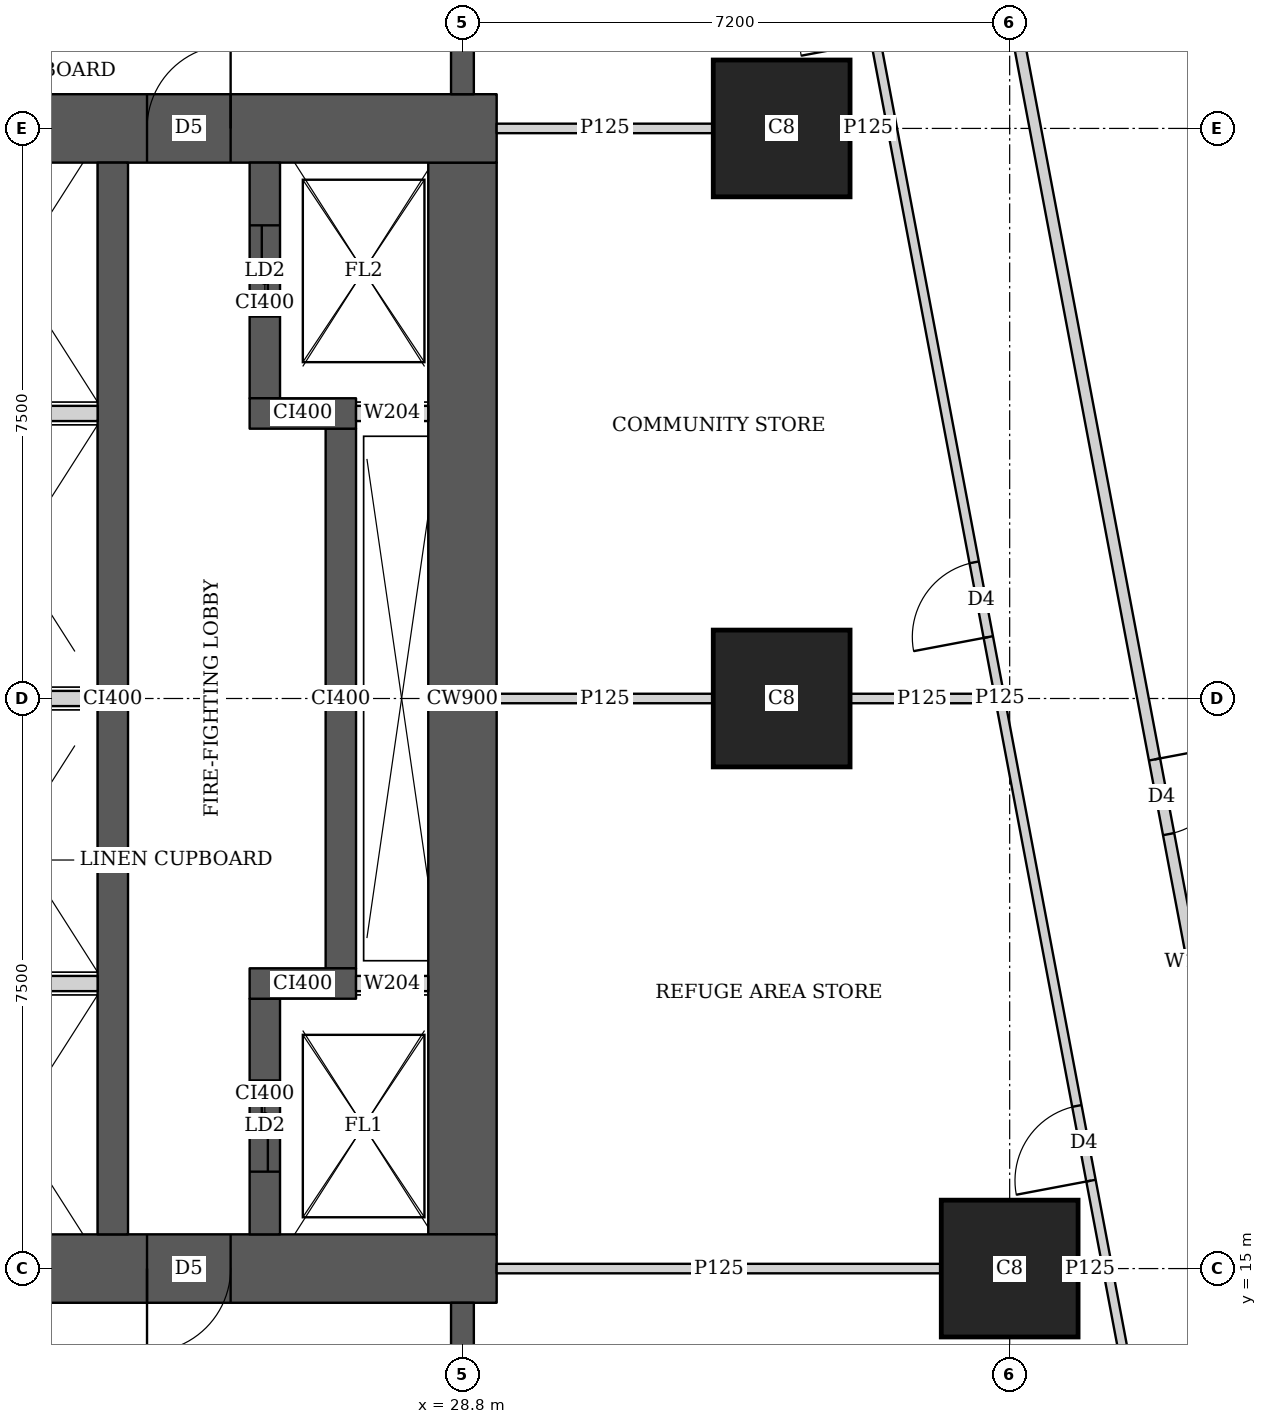
"""IFC4 building model, lengths in metres.
Left out: names, types, materials, properties, quantities, classifications, styles, units other than length and angle.
Written with IfcOpenShell. Run it as: python <this file> out.ifc"""

import sys

from ifc_helpers import new_model, si_unit, direction, frame, frame_2d, origin, origin_2d, place, context, subcontext, project, spatial, rectangle, extrude, element, fill, save


model = new_model("IFC4")
c1 = context("Model", 3, precision=1e-05, world=origin(), true_north=direction((0.0, 1.0)))
c2 = subcontext(c1, "Body", "Model", "MODEL_VIEW")
j1 = project(units=[si_unit("LENGTHUNIT", "METRE"), si_unit("PLANEANGLEUNIT", "RADIAN")], contexts=[c1])
p1 = place(None, origin())
s1 = spatial("IfcSite", under=j1, at=p1, CompositionType="ELEMENT")
p2 = place(p1, origin())
s2 = spatial("IfcBuilding", under=s1, at=p2, CompositionType="ELEMENT")
p3 = place(p2, frame((0.0, 0.0, 72.5)))
s3 = spatial("IfcBuildingStorey", under=s2, at=p3, CompositionType="ELEMENT", Elevation=72.5)
for number, where, z_axis, x_axis in (
    (1, (36.0, 15.0, 0.0), (0.0, 0.0, 1.0), (1.0, 0.0, 0.0)),
    (2, (33.0, 22.5, 0.0), (0.0, 0.0, 1.0), (1.0, 0.0, 0.0)),
    (3, (33.0, 30.0, 0.0), (0.0, 0.0, 1.0), (1.0, 0.0, 0.0)),
):
    element("IfcColumn", number, at=place(p3, frame(where, z_axis=z_axis, x_axis=x_axis)), inside=s3, PredefinedType="COLUMN", context=c2, shape_type="SweptSolid", body=[
        extrude(rectangle(XDim=1.8, YDim=1.8, at=origin_2d()), origin(), (0.0, 0.0, 1.0), 5.4),
    ])
p4 = place(p3, frame((13.95, 15.0, 0.0), z_axis=(0.0, 0.0, 1.0), x_axis=(1.0, 0.0, 0.0)))
e4 = element("IfcWall", 4, at=p4, inside=s3, PredefinedType="SHEAR", context=c2, shape_type="SweptSolid", body=[
    extrude(rectangle(XDim=15.3, YDim=0.9, at=frame_2d((7.65, 0.0))), origin(), (0.0, 0.0, 1.0), 5.4),
])
p5 = place(p4, frame((4.45, 0.0, 0.0)))
e5 = element("IfcOpeningElement", 5, at=p5, cuts=e4, PredefinedType="OPENING", context=c2, shape_type="SweptSolid", body=[
    extrude(rectangle(XDim=1.8, YDim=2.1, at=frame_2d((0.9, 1.05))), frame((0.0, 0.46, 0.0), z_axis=(0.0, -1.0, 0.0), x_axis=(1.0, 0.0, 0.0)), (0.0, 0.0, 1.0), 0.92),
])
p6 = place(p4, frame((10.7, 0.0, 0.0)))
e6 = element("IfcOpeningElement", 6, at=p6, cuts=e4, PredefinedType="OPENING", context=c2, shape_type="SweptSolid", body=[
    extrude(rectangle(XDim=1.1, YDim=2.1, at=frame_2d((0.55, 1.05))), frame((0.0, 0.46, 0.0), z_axis=(0.0, -1.0, 0.0), x_axis=(1.0, 0.0, 0.0)), (0.0, 0.0, 1.0), 0.92),
])
p7 = place(p3, frame((13.95, 30.0, 0.0), z_axis=(0.0, 0.0, 1.0), x_axis=(1.0, 0.0, 0.0)))
e7 = element("IfcWall", 7, at=p7, inside=s3, PredefinedType="SHEAR", context=c2, shape_type="SweptSolid", body=[
    extrude(rectangle(XDim=15.3, YDim=0.9, at=frame_2d((7.65, 0.0))), origin(), (0.0, 0.0, 1.0), 5.4),
])
p8 = place(p7, frame((4.45, 0.0, 0.0)))
e8 = element("IfcOpeningElement", 8, at=p8, cuts=e7, PredefinedType="OPENING", context=c2, shape_type="SweptSolid", body=[
    extrude(rectangle(XDim=1.8, YDim=2.1, at=frame_2d((0.9, 1.05))), frame((0.0, 0.46, 0.0), z_axis=(0.0, -1.0, 0.0), x_axis=(1.0, 0.0, 0.0)), (0.0, 0.0, 1.0), 0.92),
])
p9 = place(p7, frame((10.7, 0.0, 0.0)))
e9 = element("IfcOpeningElement", 9, at=p9, cuts=e7, PredefinedType="OPENING", context=c2, shape_type="SweptSolid", body=[
    extrude(rectangle(XDim=1.1, YDim=2.1, at=frame_2d((0.55, 1.05))), frame((0.0, 0.46, 0.0), z_axis=(0.0, -1.0, 0.0), x_axis=(1.0, 0.0, 0.0)), (0.0, 0.0, 1.0), 0.92),
])
p10 = place(p3, frame((28.8, 15.45, 0.0), z_axis=(0.0, 0.0, 1.0), x_axis=(0.0, 1.0, 0.0)))
e10 = element("IfcWall", 10, at=p10, inside=s3, PredefinedType="SHEAR", context=c2, shape_type="SweptSolid", body=[
    extrude(rectangle(XDim=14.1, YDim=0.9, at=frame_2d((7.05, 0.0))), origin(), (0.0, 0.0, 1.0), 5.4),
])
p11 = place(p3, frame((24.2, 15.45, 0.0), z_axis=(0.0, 0.0, 1.0), x_axis=(0.0, 1.0, 0.0)))
e11 = element("IfcWall", 11, at=p11, inside=s3, PredefinedType="SHEAR", context=c2, shape_type="SweptSolid", body=[
    extrude(rectangle(XDim=14.1, YDim=0.4, at=frame_2d((7.05, 0.0))), origin(), (0.0, 0.0, 1.0), 5.4),
])
p12 = place(p3, frame((26.2, 15.45, 0.0), z_axis=(0.0, 0.0, 1.0), x_axis=(0.0, 1.0, 0.0)))
e12 = element("IfcWall", 12, at=p12, inside=s3, PredefinedType="SHEAR", context=c2, shape_type="SweptSolid", body=[
    extrude(rectangle(XDim=3.1, YDim=0.4, at=frame_2d((1.55, 0.0))), origin(), (0.0, 0.0, 1.0), 5.4),
])
p13 = place(p12, frame((0.825, 0.0, 0.0)))
e13 = element("IfcOpeningElement", 13, at=p13, cuts=e12, PredefinedType="OPENING", context=c2, shape_type="SweptSolid", body=[
    extrude(rectangle(XDim=1.2, YDim=2.1, at=frame_2d((0.6, 1.05))), frame((0.0, 0.21, 0.0), z_axis=(0.0, -1.0, 0.0), x_axis=(1.0, 0.0, 0.0)), (0.0, 0.0, 1.0), 0.42),
])
p14 = place(p3, frame((26.0, 18.75, 0.0), z_axis=(0.0, 0.0, 1.0), x_axis=(1.0, 0.0, 0.0)))
e14 = element("IfcWall", 14, at=p14, inside=s3, PredefinedType="SHEAR", context=c2, shape_type="SweptSolid", body=[
    extrude(rectangle(XDim=1.4, YDim=0.4, at=frame_2d((0.7, 0.0))), origin(), (0.0, 0.0, 1.0), 5.4),
])
p15 = place(p3, frame((27.2, 18.95, 0.0), z_axis=(0.0, 0.0, 1.0), x_axis=(0.0, 1.0, 0.0)))
e15 = element("IfcWall", 15, at=p15, inside=s3, PredefinedType="SHEAR", context=c2, shape_type="SweptSolid", body=[
    extrude(rectangle(XDim=7.1, YDim=0.4, at=frame_2d((3.55, 0.0))), origin(), (0.0, 0.0, 1.0), 5.4),
])
p16 = place(p3, frame((26.0, 26.25, 0.0), z_axis=(0.0, 0.0, 1.0), x_axis=(1.0, 0.0, 0.0)))
e16 = element("IfcWall", 16, at=p16, inside=s3, PredefinedType="SHEAR", context=c2, shape_type="SweptSolid", body=[
    extrude(rectangle(XDim=1.4, YDim=0.4, at=frame_2d((0.7, 0.0))), origin(), (0.0, 0.0, 1.0), 5.4),
])
p17 = place(p3, frame((26.2, 26.45, 0.0), z_axis=(0.0, 0.0, 1.0), x_axis=(0.0, 1.0, 0.0)))
e17 = element("IfcWall", 17, at=p17, inside=s3, PredefinedType="SHEAR", context=c2, shape_type="SweptSolid", body=[
    extrude(rectangle(XDim=3.1, YDim=0.4, at=frame_2d((1.55, 0.0))), origin(), (0.0, 0.0, 1.0), 5.4),
])
p18 = place(p17, frame((1.075, 0.0, 0.0)))
e18 = element("IfcOpeningElement", 18, at=p18, cuts=e17, PredefinedType="OPENING", context=c2, shape_type="SweptSolid", body=[
    extrude(rectangle(XDim=1.2, YDim=2.1, at=frame_2d((0.6, 1.05))), frame((0.0, 0.21, 0.0), z_axis=(0.0, -1.0, 0.0), x_axis=(1.0, 0.0, 0.0)), (0.0, 0.0, 1.0), 0.42),
])
for number, where, z_axis, x_axis in (
    (19, (28.8, 10.35, 0.0), (0.0, 0.0, 1.0), (0.0, 1.0, 0.0)),
    (20, (28.8, 30.45, 0.0), (0.0, 0.0, 1.0), (0.0, 1.0, 0.0)),
):
    element("IfcWall", number, at=place(p3, frame(where, z_axis=z_axis, x_axis=x_axis)), inside=s3, PredefinedType="SHEAR", context=c2, shape_type="SweptSolid", body=[
        extrude(rectangle(XDim=4.2, YDim=0.3, at=frame_2d((2.1, 0.0))), origin(), (0.0, 0.0, 1.0), 5.4),
    ])
p19 = place(p3, frame((35.094, 36.585, 0.0), z_axis=(0.0, 0.0, 1.0), x_axis=(0.185591455861, -0.982626995106, 0.0)))
e21 = element("IfcWall", 21, at=p19, inside=s3, PredefinedType="SOLIDWALL", context=c2, shape_type="SweptSolid", body=[
    extrude(rectangle(XDim=35.735, YDim=0.15, at=frame_2d((17.867, 0.0))), origin(), (0.0, 0.0, 1.0), 3.35),
])
p20 = place(p19, frame((15.15, 0.0, 0.0)))
e22 = element("IfcOpeningElement", 22, at=p20, cuts=e21, PredefinedType="OPENING", context=c2, shape_type="SweptSolid", body=[
    extrude(rectangle(XDim=1.0, YDim=2.1, at=frame_2d((0.5, 1.05))), frame((0.0, 0.085, 0.0), z_axis=(0.0, -1.0, 0.0), x_axis=(1.0, 0.0, 0.0)), (0.0, 0.0, 1.0), 0.17),
])
p21 = place(p3, frame((38.202, 10.163, 0.0), z_axis=(0.0, 0.0, 1.0), x_axis=(-0.185610321132, 0.982623431783, 0.0)))
e23 = element("IfcWall", 23, at=p21, inside=s3, PredefinedType="PARTITIONING", context=c2, shape_type="SweptSolid", body=[
    extrude(rectangle(XDim=25.111, YDim=0.125, at=frame_2d((12.556, 0.0))), origin(), (0.0, 0.0, 1.0), 3.55),
])
p22 = place(p21, frame((0.708, 0.0, 0.0)))
e24 = element("IfcOpeningElement", 24, at=p22, cuts=e23, PredefinedType="OPENING", context=c2, shape_type="SweptSolid", body=[
    extrude(rectangle(XDim=1.0, YDim=2.1, at=frame_2d((0.5, 1.05))), frame((0.0, 0.073, 0.0), z_axis=(0.0, -1.0, 0.0), x_axis=(1.0, 0.0, 0.0)), (0.0, 0.0, 1.0), 0.145),
])
p23 = place(p21, frame((6.1, 0.0, 0.0)))
e25 = element("IfcOpeningElement", 25, at=p23, cuts=e23, PredefinedType="OPENING", context=c2, shape_type="SweptSolid", body=[
    extrude(rectangle(XDim=1.0, YDim=2.1, at=frame_2d((0.5, 1.05))), frame((0.0, 0.073, 0.0), z_axis=(0.0, -1.0, 0.0), x_axis=(1.0, 0.0, 0.0)), (0.0, 0.0, 1.0), 0.145),
])
p24 = place(p21, frame((13.378, 0.0, 0.0)))
e26 = element("IfcOpeningElement", 26, at=p24, cuts=e23, PredefinedType="OPENING", context=c2, shape_type="SweptSolid", body=[
    extrude(rectangle(XDim=1.0, YDim=2.1, at=frame_2d((0.5, 1.05))), frame((0.0, 0.073, 0.0), z_axis=(0.0, -1.0, 0.0), x_axis=(1.0, 0.0, 0.0)), (0.0, 0.0, 1.0), 0.145),
])
p25 = place(p21, frame((21.35, 0.0, 0.0)))
e27 = element("IfcOpeningElement", 27, at=p25, cuts=e23, PredefinedType="OPENING", context=c2, shape_type="SweptSolid", body=[
    extrude(rectangle(XDim=1.0, YDim=2.1, at=frame_2d((0.5, 1.05))), frame((0.0, 0.073, 0.0), z_axis=(0.0, -1.0, 0.0), x_axis=(1.0, 0.0, 0.0)), (0.0, 0.0, 1.0), 0.145),
])
p26 = place(p3, frame((29.25, 15.0, 0.0), z_axis=(0.0, 0.0, 1.0), x_axis=(1.0, 0.0, 0.0)))
e28 = element("IfcWall", 28, at=p26, inside=s3, PredefinedType="PARTITIONING", context=c2, shape_type="SweptSolid", body=[
    extrude(rectangle(XDim=5.849, YDim=0.125, at=frame_2d((2.925, 0.0))), origin(), (0.0, 0.0, 1.0), 3.55),
])
p27 = place(p3, frame((36.901, 15.0, 0.0), z_axis=(0.0, 0.0, 1.0), x_axis=(1.0, 0.0, 0.0)))
e29 = element("IfcWall", 29, at=p27, inside=s3, PredefinedType="PARTITIONING", context=c2, shape_type="SweptSolid", body=[
    extrude(rectangle(XDim=0.312, YDim=0.125, at=frame_2d((0.156, 0.0))), origin(), (0.0, 0.0, 1.0), 3.55),
])
p28 = place(p3, frame((29.25, 22.5, 0.0), z_axis=(0.0, 0.0, 1.0), x_axis=(1.0, 0.0, 0.0)))
e30 = element("IfcWall", 30, at=p28, inside=s3, PredefinedType="PARTITIONING", context=c2, shape_type="SweptSolid", body=[
    extrude(rectangle(XDim=2.849, YDim=0.125, at=frame_2d((1.425, 0.0))), origin(), (0.0, 0.0, 1.0), 3.55),
])
p29 = place(p3, frame((33.901, 22.5, 0.0), z_axis=(0.0, 0.0, 1.0), x_axis=(1.0, 0.0, 0.0)))
e31 = element("IfcWall", 31, at=p29, inside=s3, PredefinedType="PARTITIONING", context=c2, shape_type="SweptSolid", body=[
    extrude(rectangle(XDim=1.895, YDim=0.125, at=frame_2d((0.948, 0.0))), origin(), (0.0, 0.0, 1.0), 3.55),
])
p30 = place(p3, frame((29.25, 30.0, 0.0), z_axis=(0.0, 0.0, 1.0), x_axis=(1.0, 0.0, 0.0)))
e32 = element("IfcWall", 32, at=p30, inside=s3, PredefinedType="PARTITIONING", context=c2, shape_type="SweptSolid", body=[
    extrude(rectangle(XDim=2.849, YDim=0.125, at=frame_2d((1.425, 0.0))), origin(), (0.0, 0.0, 1.0), 3.55),
])
p31 = place(p3, frame((33.901, 30.0, 0.0), z_axis=(0.0, 0.0, 1.0), x_axis=(1.0, 0.0, 0.0)))
e33 = element("IfcWall", 33, at=p31, inside=s3, PredefinedType="PARTITIONING", context=c2, shape_type="SweptSolid", body=[
    extrude(rectangle(XDim=0.478, YDim=0.125, at=frame_2d((0.239, 0.0))), origin(), (0.0, 0.0, 1.0), 3.55),
])
for number, where, z_axis, x_axis in (
    (34, (21.8, 18.75, 0.0), (0.0, 0.0, 1.0), (1.0, 0.0, 0.0)),
    (35, (21.8, 22.5, 0.0), (0.0, 0.0, 1.0), (1.0, 0.0, 0.0)),
    (36, (21.8, 26.25, 0.0), (0.0, 0.0, 1.0), (1.0, 0.0, 0.0)),
):
    element("IfcWall", number, at=place(p3, frame(where, z_axis=z_axis, x_axis=x_axis)), inside=s3, PredefinedType="SOLIDWALL", context=c2, shape_type="SweptSolid", body=[
        extrude(rectangle(XDim=2.2, YDim=0.2, at=frame_2d((1.1, 0.0))), origin(), (0.0, 0.0, 1.0), 5.15),
    ])
for number, where, z_axis, x_axis in (
    (37, (27.4, 18.75, 0.0), (0.0, 0.0, 1.0), (1.0, 0.0, 0.0)),
    (38, (27.4, 26.25, 0.0), (0.0, 0.0, 1.0), (1.0, 0.0, 0.0)),
):
    element("IfcWall", number, at=place(p3, frame(where, z_axis=z_axis, x_axis=x_axis)), inside=s3, PredefinedType="SOLIDWALL", context=c2, shape_type="SweptSolid", body=[
        extrude(rectangle(XDim=0.95, YDim=0.2, at=frame_2d((0.475, 0.0))), origin(), (0.0, 0.0, 1.0), 5.15),
    ])
p32 = place(p20, origin())
e39 = element("IfcDoor", 39, at=p32, inside=s3, OperationType="SINGLE_SWING_LEFT", PredefinedType="DOOR", context=c2, shape_type="SweptSolid", body=[
    extrude(rectangle(XDim=1.0, YDim=2.1, at=frame_2d((0.5, 1.05))), frame((0.0, 0.025, 0.0), z_axis=(0.0, -1.0, 0.0), x_axis=(1.0, 0.0, 0.0)), (0.0, 0.0, 1.0), 0.05),
])
fill(e22, e39)
p33 = place(p23, origin())
e40 = element("IfcDoor", 40, at=p33, inside=s3, OperationType="SINGLE_SWING_LEFT", PredefinedType="DOOR", context=c2, shape_type="SweptSolid", body=[
    extrude(rectangle(XDim=1.0, YDim=2.1, at=frame_2d((0.5, 1.05))), frame((0.0, 0.025, 0.0), z_axis=(0.0, -1.0, 0.0), x_axis=(1.0, 0.0, 0.0)), (0.0, 0.0, 1.0), 0.05),
])
fill(e25, e40)
p34 = place(p24, origin())
e41 = element("IfcDoor", 41, at=p34, inside=s3, OperationType="SINGLE_SWING_LEFT", PredefinedType="DOOR", context=c2, shape_type="SweptSolid", body=[
    extrude(rectangle(XDim=1.0, YDim=2.1, at=frame_2d((0.5, 1.05))), frame((0.0, 0.025, 0.0), z_axis=(0.0, -1.0, 0.0), x_axis=(1.0, 0.0, 0.0)), (0.0, 0.0, 1.0), 0.05),
])
fill(e26, e41)
p35 = place(p6, origin())
e42 = element("IfcDoor", 42, at=p35, inside=s3, OperationType="SINGLE_SWING_RIGHT", PredefinedType="DOOR", context=c2, shape_type="SweptSolid", body=[
    extrude(rectangle(XDim=1.1, YDim=2.1, at=frame_2d((0.55, 1.05))), frame((0.0, 0.025, 0.0), z_axis=(0.0, -1.0, 0.0), x_axis=(1.0, 0.0, 0.0)), (0.0, 0.0, 1.0), 0.05),
])
fill(e6, e42)
p36 = place(p9, origin())
e43 = element("IfcDoor", 43, at=p36, inside=s3, OperationType="SINGLE_SWING_RIGHT", PredefinedType="DOOR", context=c2, shape_type="SweptSolid", body=[
    extrude(rectangle(XDim=1.1, YDim=2.1, at=frame_2d((0.55, 1.05))), frame((0.0, 0.025, 0.0), z_axis=(0.0, -1.0, 0.0), x_axis=(1.0, 0.0, 0.0)), (0.0, 0.0, 1.0), 0.05),
])
fill(e9, e43)
p37 = place(p13, origin())
e44 = element("IfcDoor", 44, at=p37, inside=s3, OperationType="DOUBLE_DOOR_SLIDING", PredefinedType="DOOR", context=c2, shape_type="SweptSolid", body=[
    extrude(rectangle(XDim=1.2, YDim=2.1, at=frame_2d((0.6, 1.05))), frame((0.0, 0.025, 0.0), z_axis=(0.0, -1.0, 0.0), x_axis=(1.0, 0.0, 0.0)), (0.0, 0.0, 1.0), 0.05),
])
fill(e13, e44)
p38 = place(p18, origin())
e45 = element("IfcDoor", 45, at=p38, inside=s3, OperationType="DOUBLE_DOOR_SLIDING", PredefinedType="DOOR", context=c2, shape_type="SweptSolid", body=[
    extrude(rectangle(XDim=1.2, YDim=2.1, at=frame_2d((0.6, 1.05))), frame((0.0, 0.025, 0.0), z_axis=(0.0, -1.0, 0.0), x_axis=(1.0, 0.0, 0.0)), (0.0, 0.0, 1.0), 0.05),
])
fill(e18, e45)
save(model, sys.argv[1])
